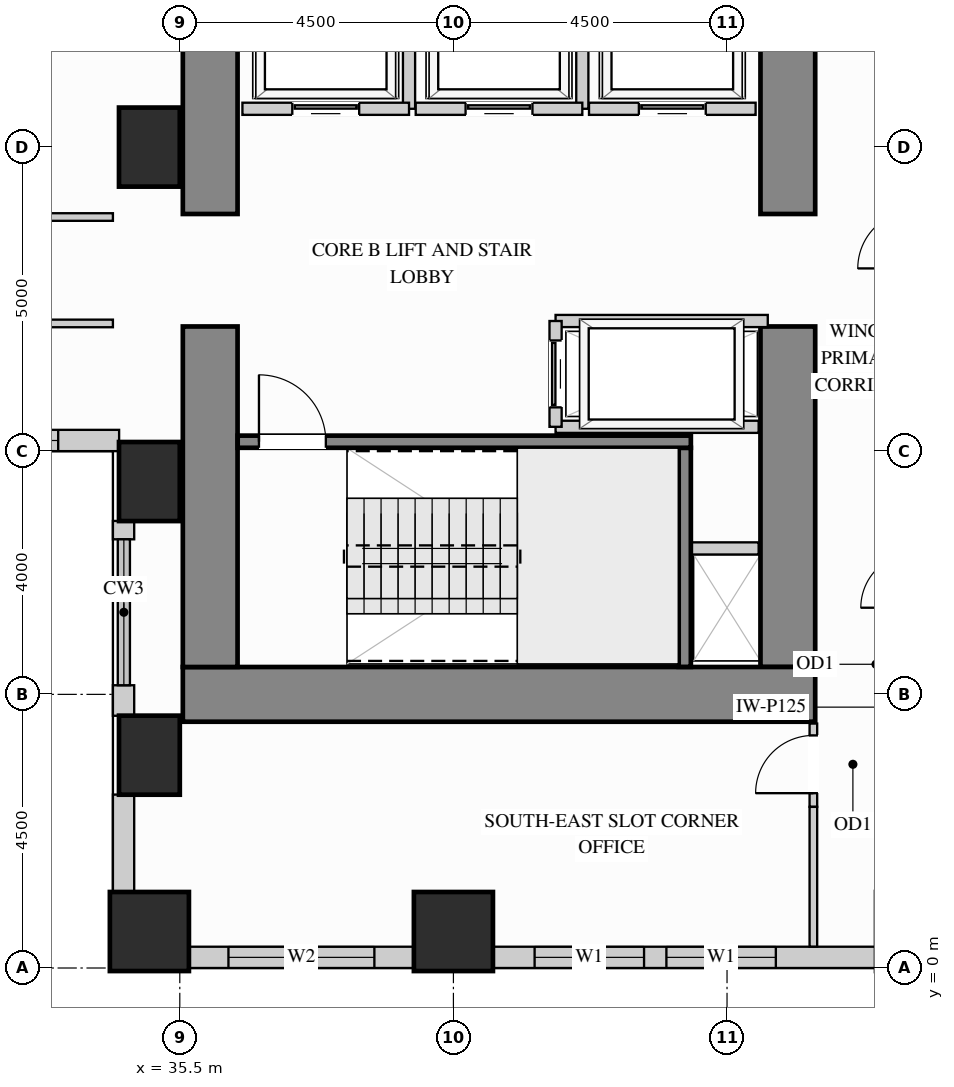
"""IFC4 building model, lengths in metres.
Left out: names, types, materials, properties, quantities, classifications, styles, units other than length and angle.
Written with IfcOpenShell. Run it as: python <this file> out.ifc"""

import sys

from ifc_helpers import new_model, si_unit, direction, frame, frame_2d, origin, origin_2d, place, context, subcontext, project, spatial, rectangle, extrude, source, transform, mapped, element, fill, save


model = new_model("IFC4")
c1 = context("Model", 3, precision=1e-05, world=origin(), true_north=direction((0.0, 1.0)))
c2 = subcontext(c1, "Body", "Model", "MODEL_VIEW")
j1 = project(units=[si_unit("LENGTHUNIT", "METRE"), si_unit("PLANEANGLEUNIT", "RADIAN")], contexts=[c1])
p1 = place(None, origin())
s1 = spatial("IfcSite", under=j1, at=p1, CompositionType="ELEMENT")
p2 = place(p1, origin())
s2 = spatial("IfcBuilding", under=s1, at=p2, CompositionType="ELEMENT")
p3 = place(p2, frame((0.0, 0.0, 44.1)))
s3 = spatial("IfcBuildingStorey", under=s2, at=p3, CompositionType="ELEMENT", Elevation=44.1)
m1 = source(origin(), c2, "Body", "SweptSolid", [
    extrude(rectangle(XDim=1.0, YDim=1.3, at=origin_2d()), origin(), (0.0, 0.0, 1.0), 3.38),
])
for number, where, z_axis, x_axis in (
    (1, (35.0, 13.5, 0.0), (0.0, 0.0, 1.0), (1.0, 0.0, 0.0)),
    (2, (35.0, 3.5, 0.0), (0.0, 0.0, 1.0), (1.0, 0.0, 0.0)),
    (3, (35.0, 8.0, 0.0), (0.0, 0.0, 1.0), (1.0, 0.0, 0.0)),
):
    element("IfcColumn", number, at=place(p3, frame(where, z_axis=z_axis, x_axis=x_axis)), inside=s3, PredefinedType="COLUMN", context=c2, shape_type="MappedRepresentation", body=[
        mapped(m1, transform((0.0, 0.0, 0.0), x_axis=(1.0, 0.0, 0.0), y_axis=(0.0, 1.0, 0.0), z_axis=(0.0, 0.0, 1.0))),
    ])
m2 = source(origin(), c2, "Body", "SweptSolid", [
    extrude(rectangle(XDim=1.3, YDim=1.3, at=origin_2d()), origin(), (0.0, 0.0, 1.0), 3.38),
])
for number, where, z_axis, x_axis in (
    (4, (35.0, 0.6, 0.0), (0.0, 0.0, 1.0), (1.0, 0.0, 0.0)),
    (5, (40.0, 0.6, 0.0), (0.0, 0.0, 1.0), (1.0, 0.0, 0.0)),
):
    element("IfcColumn", number, at=place(p3, frame(where, z_axis=z_axis, x_axis=x_axis)), inside=s3, PredefinedType="COLUMN", context=c2, shape_type="MappedRepresentation", body=[
        mapped(m2, transform((0.0, 0.0, 0.0), x_axis=(1.0, 0.0, 0.0), y_axis=(0.0, 1.0, 0.0), z_axis=(0.0, 0.0, 1.0))),
    ])
m3 = source(origin(), c2, "Body", "SweptSolid", [
    extrude(rectangle(XDim=5.6, YDim=0.9, at=frame_2d((2.8, 0.0))), origin(), (0.0, 0.0, 1.0), 3.38),
])
p4 = place(p3, frame((45.5, 4.95, 0.0), z_axis=(0.0, 0.0, 1.0), x_axis=(0.0, 1.0, 0.0)))
e6 = element("IfcWall", 6, at=p4, inside=s3, PredefinedType="SHEAR", context=c2, shape_type="MappedRepresentation", body=[
    mapped(m3, transform((0.0, 0.0, 0.0), x_axis=(1.0, 0.0, 0.0), y_axis=(0.0, 1.0, 0.0), z_axis=(0.0, 0.0, 1.0))),
])
m4 = source(origin(), c2, "Body", "SweptSolid", [
    extrude(rectangle(XDim=3.65, YDim=0.9, at=frame_2d((1.825, 0.0))), origin(), (0.0, 0.0, 1.0), 3.38),
])
p5 = place(p3, frame((45.5, 12.4, 0.0), z_axis=(0.0, 0.0, 1.0), x_axis=(0.0, 1.0, 0.0)))
e7 = element("IfcWall", 7, at=p5, inside=s3, PredefinedType="SHEAR", context=c2, shape_type="MappedRepresentation", body=[
    mapped(m4, transform((0.0, 0.0, 0.0), x_axis=(1.0, 0.0, 0.0), y_axis=(0.0, 1.0, 0.0), z_axis=(0.0, 0.0, 1.0))),
])
m5 = source(origin(), c2, "Body", "SweptSolid", [
    extrude(rectangle(XDim=10.4, YDim=0.9, at=frame_2d((5.2, 0.0))), origin(), (0.0, 0.0, 1.0), 3.38),
])
p6 = place(p3, frame((35.55, 4.5, 0.0), z_axis=(0.0, 0.0, 1.0), x_axis=(1.0, 0.0, 0.0)))
e8 = element("IfcWall", 8, at=p6, inside=s3, PredefinedType="SHEAR", context=c2, shape_type="MappedRepresentation", body=[
    mapped(m5, transform((0.0, 0.0, 0.0), x_axis=(1.0, 0.0, 0.0), y_axis=(0.0, 1.0, 0.0), z_axis=(0.0, 0.0, 1.0))),
])
p7 = place(p3, frame((36.0, 4.95, 0.0), z_axis=(0.0, 0.0, 1.0), x_axis=(0.0, 1.0, 0.0)))
e9 = element("IfcWall", 9, at=p7, inside=s3, PredefinedType="SHEAR", context=c2, shape_type="MappedRepresentation", body=[
    mapped(m3, transform((0.0, 0.0, 0.0), x_axis=(1.0, 0.0, 0.0), y_axis=(0.0, 1.0, 0.0), z_axis=(0.0, 0.0, 1.0))),
])
p8 = place(p3, frame((36.0, 12.4, 0.0), z_axis=(0.0, 0.0, 1.0), x_axis=(0.0, 1.0, 0.0)))
e10 = element("IfcWall", 10, at=p8, inside=s3, PredefinedType="SHEAR", context=c2, shape_type="MappedRepresentation", body=[
    mapped(m4, transform((0.0, 0.0, 0.0), x_axis=(1.0, 0.0, 0.0), y_axis=(0.0, 1.0, 0.0), z_axis=(0.0, 0.0, 1.0))),
])
p9 = place(p3, frame((30.998, 8.675, 0.0), z_axis=(0.0, 0.0, 1.0), x_axis=(1.0, 0.0, 0.0)))
e11 = element("IfcWall", 11, at=p9, inside=s3, PredefinedType="SOLIDWALL", context=c2, shape_type="SweptSolid", body=[
    extrude(rectangle(XDim=3.504, YDim=0.35, at=frame_2d((1.752, 0.0))), origin(), (0.0, 0.0, 1.0), 3.365),
])
p10 = place(p9, frame((1.002, 0.0, 0.78)))
e12 = element("IfcOpeningElement", 12, at=p10, cuts=e11, PredefinedType="OPENING", context=c2, shape_type="SweptSolid", body=[
    extrude(rectangle(XDim=1.5, YDim=2.0, at=frame_2d((0.75, 1.0))), frame((0.0, 0.185, 0.0), z_axis=(0.0, -1.0, 0.0), x_axis=(1.0, 0.0, 0.0)), (0.0, 0.0, 1.0), 0.37),
])
m6 = source(origin(), c2, "Body", "SweptSolid", [
    extrude(rectangle(XDim=0.302, YDim=0.35, at=frame_2d((0.151, 0.0))), origin(), (0.0, 0.0, 1.0), 2.51),
])
p11 = place(p3, frame((34.575, 7.352, 0.0), z_axis=(0.0, 0.0, 1.0), x_axis=(0.0, -1.0, 0.0)))
e13 = element("IfcWall", 13, at=p11, inside=s3, PredefinedType="SOLIDWALL", context=c2, shape_type="MappedRepresentation", body=[
    mapped(m6, transform((0.0, 0.0, 0.0), x_axis=(1.0, 0.0, 0.0), y_axis=(0.0, 1.0, 0.0), z_axis=(0.0, 0.0, 1.0))),
])
m7 = source(origin(), c2, "Body", "SweptSolid", [
    extrude(rectangle(XDim=0.502, YDim=0.35, at=frame_2d((0.251, 0.0))), origin(), (0.0, 0.0, 1.0), 2.51),
])
p12 = place(p3, frame((34.575, 4.65, 0.0), z_axis=(0.0, 0.0, 1.0), x_axis=(0.0, -1.0, 0.0)))
e14 = element("IfcWall", 14, at=p12, inside=s3, PredefinedType="SOLIDWALL", context=c2, shape_type="MappedRepresentation", body=[
    mapped(m7, transform((0.0, 0.0, 0.0), x_axis=(1.0, 0.0, 0.0), y_axis=(0.0, 1.0, 0.0), z_axis=(0.0, 0.0, 1.0))),
])
m8 = source(origin(), c2, "Body", "SweptSolid", [
    extrude(rectangle(XDim=1.604, YDim=0.35, at=frame_2d((0.802, 0.0))), origin(), (0.0, 0.0, 1.0), 2.51),
])
p13 = place(p3, frame((34.575, 2.852, 0.0), z_axis=(0.0, 0.0, 1.0), x_axis=(0.0, -1.0, 0.0)))
e15 = element("IfcWall", 15, at=p13, inside=s3, PredefinedType="SOLIDWALL", context=c2, shape_type="MappedRepresentation", body=[
    mapped(m8, transform((0.0, 0.0, 0.0), x_axis=(1.0, 0.0, 0.0), y_axis=(0.0, 1.0, 0.0), z_axis=(0.0, 0.0, 1.0))),
])
p14 = place(p3, frame((35.648, 0.175, 0.0), z_axis=(0.0, 0.0, 1.0), x_axis=(1.0, 0.0, 0.0)))
e16 = element("IfcWall", 16, at=p14, inside=s3, PredefinedType="SOLIDWALL", context=c2, shape_type="SweptSolid", body=[
    extrude(rectangle(XDim=3.704, YDim=0.35, at=frame_2d((1.852, 0.0))), origin(), (0.0, 0.0, 1.0), 2.428),
])
p15 = place(p14, frame((0.652, 0.0, 0.78)))
e17 = element("IfcOpeningElement", 17, at=p15, cuts=e16, PredefinedType="OPENING", context=c2, shape_type="SweptSolid", body=[
    extrude(rectangle(XDim=2.4, YDim=1.468, at=frame_2d((1.2, 0.734))), frame((0.0, 0.185, 0.0), z_axis=(0.0, -1.0, 0.0), x_axis=(1.0, 0.0, 0.0)), (0.0, 0.0, 1.0), 0.37),
])
p16 = place(p3, frame((40.648, 0.175, 0.0), z_axis=(0.0, 0.0, 1.0), x_axis=(1.0, 0.0, 0.0)))
e18 = element("IfcWall", 18, at=p16, inside=s3, PredefinedType="SOLIDWALL", context=c2, shape_type="SweptSolid", body=[
    extrude(rectangle(XDim=6.304, YDim=0.35, at=frame_2d((3.152, 0.0))), origin(), (0.0, 0.0, 1.0), 2.428),
])
p17 = place(p16, frame((0.687, 0.0, 0.78)))
e19 = element("IfcOpeningElement", 19, at=p17, cuts=e18, PredefinedType="OPENING", context=c2, shape_type="SweptSolid", body=[
    extrude(rectangle(XDim=1.8, YDim=1.468, at=frame_2d((0.9, 0.734))), frame((0.0, 0.185, 0.0), z_axis=(0.0, -1.0, 0.0), x_axis=(1.0, 0.0, 0.0)), (0.0, 0.0, 1.0), 0.37),
])
p18 = place(p16, frame((2.855, 0.0, 0.78)))
e20 = element("IfcOpeningElement", 20, at=p18, cuts=e18, PredefinedType="OPENING", context=c2, shape_type="SweptSolid", body=[
    extrude(rectangle(XDim=1.8, YDim=1.468, at=frame_2d((0.9, 0.734))), frame((0.0, 0.185, 0.0), z_axis=(0.0, -1.0, 0.0), x_axis=(1.0, 0.0, 0.0)), (0.0, 0.0, 1.0), 0.37),
])
p19 = place(p3, frame((45.92, 2.65, 0.0), z_axis=(0.0, 0.0, 1.0), x_axis=(0.0, 1.0, 0.0)))
e21 = element("IfcWall", 21, at=p19, inside=s3, PredefinedType="PARTITIONING", context=c2, shape_type="SweptSolid", body=[
    extrude(rectangle(XDim=1.37, YDim=0.125, at=frame_2d((0.685, 0.0))), origin(), (0.0, 0.0, 1.0), 3.365),
])
p20 = place(p19, frame((0.225, 0.0, 0.0)))
e22 = element("IfcOpeningElement", 22, at=p20, cuts=e21, PredefinedType="OPENING", context=c2, shape_type="SweptSolid", body=[
    extrude(rectangle(XDim=0.95, YDim=2.15, at=frame_2d((0.475, 1.075))), frame((0.0, 0.073, 0.0), z_axis=(0.0, -1.0, 0.0), x_axis=(1.0, 0.0, 0.0)), (0.0, 0.0, 1.0), 0.145),
])
m9 = source(origin(), c2, "Body", "SweptSolid", [
    extrude(rectangle(XDim=2.298, YDim=0.125, at=frame_2d((1.149, 0.0))), origin(), (0.0, 0.0, 1.0), 3.365),
])
p21 = place(p3, frame((45.92, 0.352, 0.0), z_axis=(0.0, 0.0, 1.0), x_axis=(0.0, 1.0, 0.0)))
e23 = element("IfcWall", 23, at=p21, inside=s3, PredefinedType="PARTITIONING", context=c2, shape_type="MappedRepresentation", body=[
    mapped(m9, transform((0.0, 0.0, 0.0), x_axis=(1.0, 0.0, 0.0), y_axis=(0.0, 1.0, 0.0), z_axis=(0.0, 0.0, 1.0))),
])
p22 = place(p3, frame((29.85, 12.35, 0.0), z_axis=(0.0, 0.0, 1.0), x_axis=(1.0, 0.0, 0.0)))
e24 = element("IfcWall", 24, at=p22, inside=s3, PredefinedType="PARTITIONING", context=c2, shape_type="SweptSolid", body=[
    extrude(rectangle(XDim=4.55, YDim=0.125, at=frame_2d((2.275, 0.0))), origin(), (0.0, 0.0, 1.0), 3.365),
])
p23 = place(p22, frame((1.8, 0.0, 0.0)))
e25 = element("IfcOpeningElement", 25, at=p23, cuts=e24, PredefinedType="OPENING", context=c2, shape_type="SweptSolid", body=[
    extrude(rectangle(XDim=0.95, YDim=2.15, at=frame_2d((0.475, 1.075))), frame((0.0, 0.073, 0.0), z_axis=(0.0, -1.0, 0.0), x_axis=(1.0, 0.0, 0.0)), (0.0, 0.0, 1.0), 0.145),
])
p24 = place(p3, frame((19.5, 10.6, 0.0), z_axis=(0.0, 0.0, 1.0), x_axis=(1.0, 0.0, 0.0)))
e26 = element("IfcWall", 26, at=p24, inside=s3, PredefinedType="PARTITIONING", context=c2, shape_type="SweptSolid", body=[
    extrude(rectangle(XDim=14.9, YDim=0.125, at=frame_2d((7.45, 0.0))), origin(), (0.0, 0.0, 1.0), 3.365),
])
p25 = place(p24, frame((6.975, 0.0, 0.0)))
e27 = element("IfcOpeningElement", 27, at=p25, cuts=e26, PredefinedType="OPENING", context=c2, shape_type="SweptSolid", body=[
    extrude(rectangle(XDim=0.95, YDim=2.15, at=frame_2d((0.475, 1.075))), frame((0.0, 0.073, 0.0), z_axis=(0.0, -1.0, 0.0), x_axis=(1.0, 0.0, 0.0)), (0.0, 0.0, 1.0), 0.145),
])
m10 = source(origin(), c2, "Body", "SweptSolid", [
    extrude(rectangle(XDim=1.17, YDim=0.2, at=frame_2d((0.585, 0.0))), origin(), (0.0, 0.0, 1.0), 3.365),
])
p26 = place(p3, frame((43.85, 6.9, 0.0), z_axis=(0.0, 0.0, 1.0), x_axis=(1.0, 0.0, 0.0)))
e28 = element("IfcWall", 28, at=p26, inside=s3, PredefinedType="PARTITIONING", context=c2, shape_type="MappedRepresentation", body=[
    mapped(m10, transform((0.0, 0.0, 0.0), x_axis=(1.0, 0.0, 0.0), y_axis=(0.0, 1.0, 0.0), z_axis=(0.0, 0.0, 1.0))),
])
m11 = source(origin(), c2, "Body", "SweptSolid", [
    extrude(rectangle(XDim=1.89, YDim=0.2, at=frame_2d((0.945, 0.0))), origin(), (0.0, 0.0, 1.0), 3.365),
])
p27 = place(p3, frame((39.27, 14.13, 0.0), z_axis=(0.0, 0.0, 1.0), x_axis=(0.0, 1.0, 0.0)))
e29 = element("IfcWall", 29, at=p27, inside=s3, PredefinedType="PARTITIONING", context=c2, shape_type="MappedRepresentation", body=[
    mapped(m11, transform((0.0, 0.0, 0.0), x_axis=(1.0, 0.0, 0.0), y_axis=(0.0, 1.0, 0.0), z_axis=(0.0, 0.0, 1.0))),
])
p28 = place(p3, frame((36.53, 14.13, 0.0), z_axis=(0.0, 0.0, 1.0), x_axis=(1.0, 0.0, 0.0)))
e30 = element("IfcWall", 30, at=p28, inside=s3, PredefinedType="PARTITIONING", context=c2, shape_type="SweptSolid", body=[
    extrude(rectangle(XDim=2.74, YDim=0.2, at=frame_2d((1.37, 0.0))), origin(), (0.0, 0.0, 1.0), 3.365),
])
p29 = place(p28, frame((0.82, 0.0, 0.0)))
e31 = element("IfcOpeningElement", 31, at=p29, cuts=e30, PredefinedType="OPENING", context=c2, shape_type="SweptSolid", body=[
    extrude(rectangle(XDim=1.1, YDim=2.2, at=frame_2d((0.55, 1.1))), frame((0.0, 0.11, 0.0), z_axis=(0.0, -1.0, 0.0), x_axis=(1.0, 0.0, 0.0)), (0.0, 0.0, 1.0), 0.22),
])
p30 = place(p3, frame((42.12, 14.13, 0.0), z_axis=(0.0, 0.0, 1.0), x_axis=(0.0, 1.0, 0.0)))
e32 = element("IfcWall", 32, at=p30, inside=s3, PredefinedType="PARTITIONING", context=c2, shape_type="MappedRepresentation", body=[
    mapped(m11, transform((0.0, 0.0, 0.0), x_axis=(1.0, 0.0, 0.0), y_axis=(0.0, 1.0, 0.0), z_axis=(0.0, 0.0, 1.0))),
])
p31 = place(p3, frame((39.38, 14.13, 0.0), z_axis=(0.0, 0.0, 1.0), x_axis=(1.0, 0.0, 0.0)))
e33 = element("IfcWall", 33, at=p31, inside=s3, PredefinedType="PARTITIONING", context=c2, shape_type="SweptSolid", body=[
    extrude(rectangle(XDim=2.74, YDim=0.2, at=frame_2d((1.37, 0.0))), origin(), (0.0, 0.0, 1.0), 3.365),
])
p32 = place(p31, frame((0.82, 0.0, 0.0)))
e34 = element("IfcOpeningElement", 34, at=p32, cuts=e33, PredefinedType="OPENING", context=c2, shape_type="SweptSolid", body=[
    extrude(rectangle(XDim=1.1, YDim=2.2, at=frame_2d((0.55, 1.1))), frame((0.0, 0.11, 0.0), z_axis=(0.0, -1.0, 0.0), x_axis=(1.0, 0.0, 0.0)), (0.0, 0.0, 1.0), 0.22),
])
p33 = place(p3, frame((42.23, 14.13, 0.0), z_axis=(0.0, 0.0, 1.0), x_axis=(1.0, 0.0, 0.0)))
e35 = element("IfcWall", 35, at=p33, inside=s3, PredefinedType="PARTITIONING", context=c2, shape_type="SweptSolid", body=[
    extrude(rectangle(XDim=2.74, YDim=0.2, at=frame_2d((1.37, 0.0))), origin(), (0.0, 0.0, 1.0), 3.365),
])
p34 = place(p33, frame((0.82, 0.0, 0.0)))
e36 = element("IfcOpeningElement", 36, at=p34, cuts=e35, PredefinedType="OPENING", context=c2, shape_type="SweptSolid", body=[
    extrude(rectangle(XDim=1.1, YDim=2.2, at=frame_2d((0.55, 1.1))), frame((0.0, 0.11, 0.0), z_axis=(0.0, -1.0, 0.0), x_axis=(1.0, 0.0, 0.0)), (0.0, 0.0, 1.0), 0.22),
])
m12 = source(origin(), c2, "Body", "SweptSolid", [
    extrude(rectangle(XDim=3.49, YDim=0.2, at=frame_2d((1.745, 0.0))), origin(), (0.0, 0.0, 1.0), 3.365),
])
p35 = place(p3, frame((41.68, 10.64, 0.0), z_axis=(0.0, 0.0, 1.0), x_axis=(1.0, 0.0, 0.0)))
e37 = element("IfcWall", 37, at=p35, inside=s3, PredefinedType="PARTITIONING", context=c2, shape_type="MappedRepresentation", body=[
    mapped(m12, transform((0.0, 0.0, 0.0), x_axis=(1.0, 0.0, 0.0), y_axis=(0.0, 1.0, 0.0), z_axis=(0.0, 0.0, 1.0))),
])
m13 = source(origin(), c2, "Body", "SweptSolid", [
    extrude(rectangle(XDim=3.34, YDim=0.2, at=frame_2d((1.67, 0.0))), origin(), (0.0, 0.0, 1.0), 3.365),
])
p36 = place(p3, frame((41.68, 8.9, 0.0), z_axis=(0.0, 0.0, 1.0), x_axis=(1.0, 0.0, 0.0)))
e38 = element("IfcWall", 38, at=p36, inside=s3, PredefinedType="PARTITIONING", context=c2, shape_type="MappedRepresentation", body=[
    mapped(m13, transform((0.0, 0.0, 0.0), x_axis=(1.0, 0.0, 0.0), y_axis=(0.0, 1.0, 0.0), z_axis=(0.0, 0.0, 1.0))),
])
p37 = place(p3, frame((41.68, 8.9, 0.0), z_axis=(0.0, 0.0, 1.0), x_axis=(0.0, 1.0, 0.0)))
e39 = element("IfcWall", 39, at=p37, inside=s3, PredefinedType="PARTITIONING", context=c2, shape_type="SweptSolid", body=[
    extrude(rectangle(XDim=1.74, YDim=0.2, at=frame_2d((0.87, 0.0))), origin(), (0.0, 0.0, 1.0), 3.365),
])
p38 = place(p37, frame((0.32, 0.0, 0.0)))
e40 = element("IfcOpeningElement", 40, at=p38, cuts=e39, PredefinedType="OPENING", context=c2, shape_type="SweptSolid", body=[
    extrude(rectangle(XDim=1.1, YDim=2.2, at=frame_2d((0.55, 1.1))), frame((0.0, 0.11, 0.0), z_axis=(0.0, -1.0, 0.0), x_axis=(1.0, 0.0, 0.0)), (0.0, 0.0, 1.0), 0.22),
])
m14 = source(origin(), c2, "Body", "SweptSolid", [
    extrude(rectangle(XDim=3.603, YDim=0.2, at=frame_2d((1.802, 0.0))), origin(), (0.0, 0.0, 1.0), 3.38),
])
p39 = place(p3, frame((43.805, 4.952, 0.0), z_axis=(0.0, 0.0, 1.0), x_axis=(0.0, 1.0, 0.0)))
e41 = element("IfcWall", 41, at=p39, inside=s3, PredefinedType="SHEAR", context=c2, shape_type="MappedRepresentation", body=[
    mapped(m14, transform((0.0, 0.0, 0.0), x_axis=(1.0, 0.0, 0.0), y_axis=(0.0, 1.0, 0.0), z_axis=(0.0, 0.0, 1.0))),
])
p40 = place(p3, frame((36.452, 8.655, 0.0), z_axis=(0.0, 0.0, 1.0), x_axis=(1.0, 0.0, 0.0)))
e42 = element("IfcWall", 42, at=p40, inside=s3, PredefinedType="SHEAR", context=c2, shape_type="SweptSolid", body=[
    extrude(rectangle(XDim=7.453, YDim=0.2, at=frame_2d((3.727, 0.0))), origin(), (0.0, 0.0, 1.0), 3.38),
])
p41 = place(p40, frame((0.35, 0.0, 0.0)))
e43 = element("IfcOpeningElement", 43, at=p41, cuts=e42, PredefinedType="OPENING", context=c2, shape_type="SweptSolid", body=[
    extrude(rectangle(XDim=1.1, YDim=2.15, at=frame_2d((0.55, 1.075))), frame((0.0, 0.11, 0.0), z_axis=(0.0, -1.0, 0.0), x_axis=(1.0, 0.0, 0.0)), (0.0, 0.0, 1.0), 0.22),
])
m15 = source(origin(), c2, "Body", "SweptSolid", [
    extrude(rectangle(XDim=1.1, YDim=2.2, at=frame_2d((0.55, 1.1))), frame((0.0, 0.025, 0.0), z_axis=(0.0, -1.0, 0.0), x_axis=(1.0, 0.0, 0.0)), (0.0, 0.0, 1.0), 0.05),
])
p42 = place(p29, origin())
e44 = element("IfcDoor", 44, at=p42, inside=s3, OperationType="SLIDING_TO_LEFT", PredefinedType="DOOR", context=c2, shape_type="MappedRepresentation", body=[
    mapped(m15, transform((0.0, 0.0, 0.0), x_axis=(1.0, 0.0, 0.0), y_axis=(0.0, 1.0, 0.0), z_axis=(0.0, 0.0, 1.0))),
])
fill(e31, e44)
p43 = place(p32, origin())
e45 = element("IfcDoor", 45, at=p43, inside=s3, OperationType="SLIDING_TO_LEFT", PredefinedType="DOOR", context=c2, shape_type="MappedRepresentation", body=[
    mapped(m15, transform((0.0, 0.0, 0.0), x_axis=(1.0, 0.0, 0.0), y_axis=(0.0, 1.0, 0.0), z_axis=(0.0, 0.0, 1.0))),
])
fill(e34, e45)
p44 = place(p34, origin())
e46 = element("IfcDoor", 46, at=p44, inside=s3, OperationType="SLIDING_TO_LEFT", PredefinedType="DOOR", context=c2, shape_type="MappedRepresentation", body=[
    mapped(m15, transform((0.0, 0.0, 0.0), x_axis=(1.0, 0.0, 0.0), y_axis=(0.0, 1.0, 0.0), z_axis=(0.0, 0.0, 1.0))),
])
fill(e36, e46)
p45 = place(p38, origin())
e47 = element("IfcDoor", 47, at=p45, inside=s3, OperationType="SLIDING_TO_LEFT", PredefinedType="DOOR", context=c2, shape_type="MappedRepresentation", body=[
    mapped(m15, transform((0.0, 0.0, 0.0), x_axis=(1.0, 0.0, 0.0), y_axis=(0.0, 1.0, 0.0), z_axis=(0.0, 0.0, 1.0))),
])
fill(e40, e47)
m16 = source(origin(), c2, "Body", "SweptSolid", [
    extrude(rectangle(XDim=0.95, YDim=2.15, at=frame_2d((0.475, 1.075))), frame((0.0, 0.025, 0.0), z_axis=(0.0, -1.0, 0.0), x_axis=(1.0, 0.0, 0.0)), (0.0, 0.0, 1.0), 0.05),
])
p46 = place(p20, origin())
e48 = element("IfcDoor", 48, at=p46, inside=s3, OperationType="SINGLE_SWING_LEFT", PredefinedType="DOOR", context=c2, shape_type="MappedRepresentation", body=[
    mapped(m16, transform((0.0, 0.0, 0.0), x_axis=(1.0, 0.0, 0.0), y_axis=(0.0, 1.0, 0.0), z_axis=(0.0, 0.0, 1.0))),
])
fill(e22, e48)
m17 = source(origin(), c2, "Body", "SweptSolid", [
    extrude(rectangle(XDim=1.1, YDim=2.15, at=frame_2d((0.55, 1.075))), frame((0.0, 0.025, 0.0), z_axis=(0.0, -1.0, 0.0), x_axis=(1.0, 0.0, 0.0)), (0.0, 0.0, 1.0), 0.05),
])
p47 = place(p41, origin())
e49 = element("IfcDoor", 49, at=p47, inside=s3, OperationType="SINGLE_SWING_LEFT", PredefinedType="DOOR", context=c2, shape_type="MappedRepresentation", body=[
    mapped(m17, transform((0.0, 0.0, 0.0), x_axis=(1.0, 0.0, 0.0), y_axis=(0.0, 1.0, 0.0), z_axis=(0.0, 0.0, 1.0))),
])
fill(e43, e49)
m18 = source(origin(), c2, "Body", "SweptSolid", [
    extrude(rectangle(XDim=1.8, YDim=1.468, at=frame_2d((0.9, 0.734))), frame((0.0, 0.03, 0.0), z_axis=(0.0, -1.0, 0.0), x_axis=(1.0, 0.0, 0.0)), (0.0, 0.0, 1.0), 0.06),
])
p48 = place(p17, origin())
e50 = element("IfcWindow", 50, at=p48, inside=s3, PartitioningType="SINGLE_PANEL", PredefinedType="WINDOW", context=c2, shape_type="MappedRepresentation", body=[
    mapped(m18, transform((0.0, 0.0, 0.0), x_axis=(1.0, 0.0, 0.0), y_axis=(0.0, 1.0, 0.0), z_axis=(0.0, 0.0, 1.0))),
])
fill(e19, e50)
p49 = place(p18, origin())
e51 = element("IfcWindow", 51, at=p49, inside=s3, PartitioningType="SINGLE_PANEL", PredefinedType="WINDOW", context=c2, shape_type="MappedRepresentation", body=[
    mapped(m18, transform((0.0, 0.0, 0.0), x_axis=(1.0, 0.0, 0.0), y_axis=(0.0, 1.0, 0.0), z_axis=(0.0, 0.0, 1.0))),
])
fill(e20, e51)
m19 = source(origin(), c2, "Body", "SweptSolid", [
    extrude(rectangle(XDim=2.4, YDim=1.468, at=frame_2d((1.2, 0.734))), frame((0.0, 0.03, 0.0), z_axis=(0.0, -1.0, 0.0), x_axis=(1.0, 0.0, 0.0)), (0.0, 0.0, 1.0), 0.06),
])
p50 = place(p15, origin())
e52 = element("IfcWindow", 52, at=p50, inside=s3, PartitioningType="SINGLE_PANEL", PredefinedType="WINDOW", context=c2, shape_type="MappedRepresentation", body=[
    mapped(m19, transform((0.0, 0.0, 0.0), x_axis=(1.0, 0.0, 0.0), y_axis=(0.0, 1.0, 0.0), z_axis=(0.0, 0.0, 1.0))),
])
fill(e17, e52)
m20 = source(origin(), c2, "Body", "SweptSolid", [
    extrude(rectangle(XDim=1.5, YDim=2.0, at=frame_2d((0.75, 1.0))), frame((0.0, 0.03, 0.0), z_axis=(0.0, -1.0, 0.0), x_axis=(1.0, 0.0, 0.0)), (0.0, 0.0, 1.0), 0.06),
])
p51 = place(p10, origin())
e53 = element("IfcWindow", 53, at=p51, inside=s3, PartitioningType="SINGLE_PANEL", PredefinedType="WINDOW", context=c2, shape_type="MappedRepresentation", body=[
    mapped(m20, transform((0.0, 0.0, 0.0), x_axis=(1.0, 0.0, 0.0), y_axis=(0.0, 1.0, 0.0), z_axis=(0.0, 0.0, 1.0))),
])
fill(e12, e53)
save(model, sys.argv[1])
